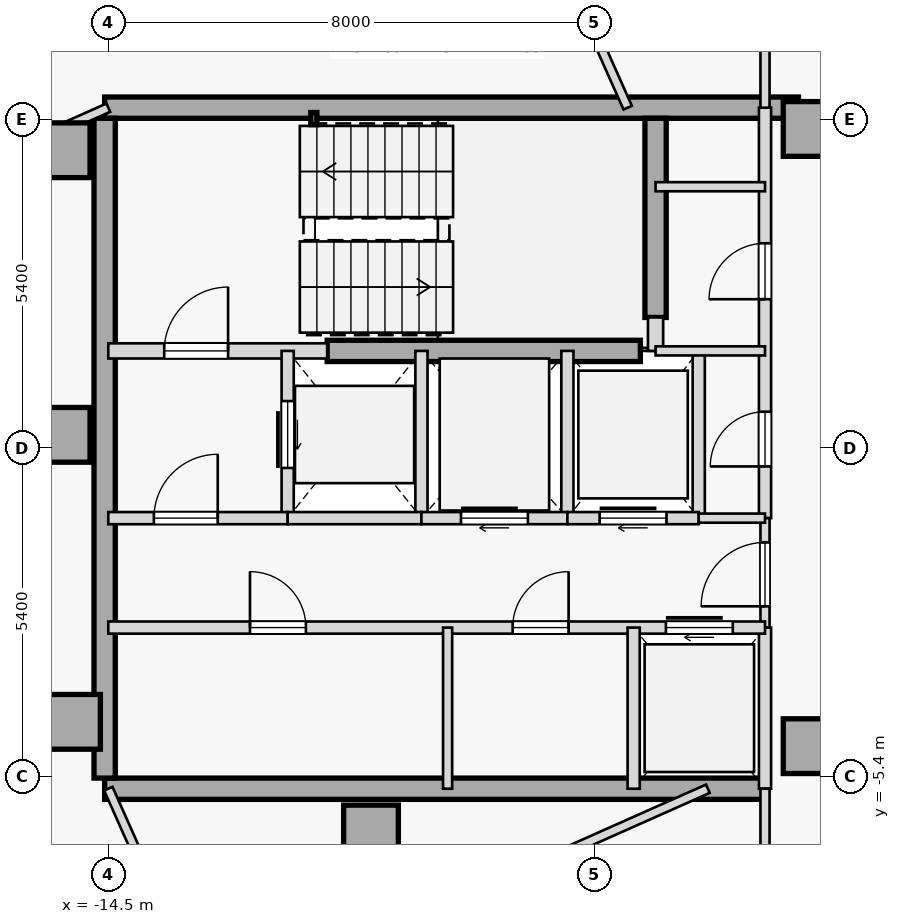
"""IFC4 building model, lengths in metres.
Left out: names, types, materials, properties, quantities, classifications, styles, units other than length and angle.
Written with IfcOpenShell. Run it as: python <this file> out.ifc"""

import sys

from ifc_helpers import new_model, si_unit, direction, frame, frame_2d, origin, origin_2d, place, context, subcontext, project, spatial, rectangle, hollow_rectangle, extrude, element, fill, save


model = new_model("IFC4")
c1 = context("Model", 3, precision=1e-05, world=origin(), true_north=direction((0.0, 1.0)))
c2 = subcontext(c1, "Body", "Model", "MODEL_VIEW")
j1 = project(units=[si_unit("LENGTHUNIT", "METRE"), si_unit("PLANEANGLEUNIT", "RADIAN")], contexts=[c1])
p1 = place(None, origin())
s1 = spatial("IfcSite", under=j1, at=p1, CompositionType="ELEMENT")
p2 = place(p1, origin())
s2 = spatial("IfcBuilding", under=s1, at=p2, CompositionType="ELEMENT")
p3 = place(p2, frame((0.0, 0.0, 295.3)))
s3 = spatial("IfcBuildingStorey", under=s2, at=p3, CompositionType="ELEMENT", Elevation=295.3)
for number, where, z_axis, x_axis in (
    (1, (-15.25, 4.9, 0.0), (0.0, 0.0, 1.0), (1.0, 0.0, 0.0)),
    (2, (-15.25, 0.22, 0.0), (0.0, 0.0, 1.0), (1.0, 0.0, 0.0)),
    (3, (-15.08, -4.5, 0.0), (0.0, 0.0, 1.0), (1.0, 0.0, 0.0)),
    (4, (-10.18, -6.32, 0.0), (0.0, 0.0, 1.0), (1.0, 0.0, 0.0)),
    (5, (-2.95, -4.9, 0.0), (0.0, 0.0, 1.0), (1.0, 0.0, 0.0)),
    (6, (-2.95, 5.25, 0.0), (0.0, 0.0, 1.0), (1.0, 0.0, 0.0)),
):
    element("IfcColumn", number, at=place(p3, frame(where, z_axis=z_axis, x_axis=x_axis)), inside=s3, PredefinedType="COLUMN", context=c2, shape_type="SweptSolid", body=[
        extrude(rectangle(XDim=0.9, YDim=0.9, at=origin_2d()), origin(), (0.0, 0.0, 1.0), 3.35),
    ])
p4 = place(p3, frame((-14.56, 5.6, 0.0), z_axis=(0.0, 0.0, 1.0), x_axis=(1.0, 0.0, 0.0)))
e7 = element("IfcWall", 7, at=p4, inside=s3, PredefinedType="SHEAR", context=c2, shape_type="SweptSolid", body=[
    extrude(rectangle(XDim=11.41, YDim=0.35, at=frame_2d((5.705, 0.0))), origin(), (0.0, 0.0, 1.0), 3.125),
])
p5 = place(p3, frame((-14.56, -5.6, 0.0), z_axis=(0.0, 0.0, 1.0), x_axis=(1.0, 0.0, 0.0)))
e8 = element("IfcWall", 8, at=p5, inside=s3, PredefinedType="SHEAR", context=c2, shape_type="SweptSolid", body=[
    extrude(rectangle(XDim=10.86, YDim=0.35, at=frame_2d((5.43, 0.0))), origin(), (0.0, 0.0, 1.0), 3.125),
])
p6 = place(p3, frame((-14.56, -5.425, 0.0), z_axis=(0.0, 0.0, 1.0), x_axis=(0.0, 1.0, 0.0)))
e9 = element("IfcWall", 9, at=p6, inside=s3, PredefinedType="SHEAR", context=c2, shape_type="SweptSolid", body=[
    extrude(rectangle(XDim=10.85, YDim=0.35, at=frame_2d((5.425, 0.0))), origin(), (0.0, 0.0, 1.0), 3.125),
])
p7 = place(p3, frame((-5.5, 2.15, 0.0), z_axis=(0.0, 0.0, 1.0), x_axis=(0.0, 1.0, 0.0)))
e10 = element("IfcWall", 10, at=p7, inside=s3, PredefinedType="SHEAR", context=c2, shape_type="SweptSolid", body=[
    extrude(rectangle(XDim=3.275, YDim=0.35, at=frame_2d((1.638, 0.0))), origin(), (0.0, 0.0, 1.0), 3.125),
])
p8 = place(p3, frame((-10.9, 1.6, 0.0), z_axis=(0.0, 0.0, 1.0), x_axis=(1.0, 0.0, 0.0)))
e11 = element("IfcWall", 11, at=p8, inside=s3, PredefinedType="SHEAR", context=c2, shape_type="SweptSolid", body=[
    extrude(rectangle(XDim=5.15, YDim=0.35, at=frame_2d((2.575, 0.0))), origin(), (0.0, 0.0, 1.0), 3.125),
])
p9 = place(p3, frame((-11.12, 5.42, 0.0), z_axis=(0.0, 0.0, 1.0), x_axis=(1.0, 0.0, 0.0)))
e12 = element("IfcColumn", 12, at=p9, inside=s3, PredefinedType="COLUMN", context=c2, shape_type="SweptSolid", body=[
    extrude(hollow_rectangle(XDim=0.1, YDim=0.2, WallThickness=0.008, at=origin_2d()), origin(), (0.0, 0.0, 1.0), 3.35),
])
p10 = place(p3, frame((-14.5, 1.6, 0.0), z_axis=(0.0, 0.0, 1.0), x_axis=(1.0, 0.0, 0.0)))
e13 = element("IfcWall", 13, at=p10, inside=s3, PredefinedType="STANDARD", context=c2, shape_type="SweptSolid", body=[
    extrude(rectangle(XDim=3.6, YDim=0.25, at=frame_2d((1.8, 0.0))), origin(), (0.0, 0.0, 1.0), 3.125),
])
p11 = place(p10, frame((0.92, 0.0, 0.0)))
e14 = element("IfcOpeningElement", 14, at=p11, cuts=e13, PredefinedType="OPENING", context=c2, shape_type="SweptSolid", body=[
    extrude(rectangle(XDim=1.05, YDim=2.15, at=frame_2d((0.525, 1.075))), frame((0.0, 0.135, 0.0), z_axis=(0.0, -1.0, 0.0), x_axis=(1.0, 0.0, 0.0)), (0.0, 0.0, 1.0), 0.27),
])
p12 = place(p3, frame((-5.5, 1.6, 0.0), z_axis=(0.0, 0.0, 1.0), x_axis=(0.0, 1.0, 0.0)))
e15 = element("IfcWall", 15, at=p12, inside=s3, PredefinedType="STANDARD", context=c2, shape_type="SweptSolid", body=[
    extrude(rectangle(XDim=0.55, YDim=0.25, at=frame_2d((0.275, 0.0))), origin(), (0.0, 0.0, 1.0), 3.125),
])
p13 = place(p3, frame((-3.7, -1.15, 0.0), z_axis=(0.0, 0.0, 1.0), x_axis=(0.0, 1.0, 0.0)))
e16 = element("IfcWall", 16, at=p13, inside=s3, PredefinedType="STANDARD", context=c2, shape_type="SweptSolid", body=[
    extrude(rectangle(XDim=6.75, YDim=0.2, at=frame_2d((3.375, 0.0))), origin(), (0.0, 0.0, 1.0), 3.125),
])
p14 = place(p13, frame((3.6, 0.0, 0.0)))
e17 = element("IfcOpeningElement", 17, at=p14, cuts=e16, PredefinedType="OPENING", context=c2, shape_type="SweptSolid", body=[
    extrude(rectangle(XDim=0.92, YDim=2.15, at=frame_2d((0.46, 1.075))), frame((0.0, 0.11, 0.0), z_axis=(0.0, -1.0, 0.0), x_axis=(1.0, 0.0, 0.0)), (0.0, 0.0, 1.0), 0.22),
])
p15 = place(p13, frame((0.85, 0.0, 0.0)))
e18 = element("IfcOpeningElement", 18, at=p15, cuts=e16, PredefinedType="OPENING", context=c2, shape_type="SweptSolid", body=[
    extrude(rectangle(XDim=0.9, YDim=2.15, at=frame_2d((0.45, 1.075))), frame((0.0, 0.11, 0.0), z_axis=(0.0, -1.0, 0.0), x_axis=(1.0, 0.0, 0.0)), (0.0, 0.0, 1.0), 0.22),
])
p16 = place(p3, frame((-3.7, -2.95, 0.0), z_axis=(0.0, 0.0, 1.0), x_axis=(0.0, 1.0, 0.0)))
e19 = element("IfcWall", 19, at=p16, inside=s3, PredefinedType="PARTITIONING", context=c2, shape_type="SweptSolid", body=[
    extrude(rectangle(XDim=1.8, YDim=0.15, at=frame_2d((0.9, 0.0))), origin(), (0.0, 0.0, 1.0), 3.125),
])
p17 = place(p16, frame((0.35, 0.0, 0.0)))
e20 = element("IfcOpeningElement", 20, at=p17, cuts=e19, PredefinedType="OPENING", context=c2, shape_type="SweptSolid", body=[
    extrude(rectangle(XDim=1.05, YDim=2.18, at=frame_2d((0.525, 1.09))), frame((0.0, 0.085, 0.0), z_axis=(0.0, -1.0, 0.0), x_axis=(1.0, 0.0, 0.0)), (0.0, 0.0, 1.0), 0.17),
])
p18 = place(p3, frame((-3.7, -5.6, 0.0), z_axis=(0.0, 0.0, 1.0), x_axis=(0.0, 1.0, 0.0)))
e21 = element("IfcWall", 21, at=p18, inside=s3, PredefinedType="STANDARD", context=c2, shape_type="SweptSolid", body=[
    extrude(rectangle(XDim=2.65, YDim=0.2, at=frame_2d((1.325, 0.0))), origin(), (0.0, 0.0, 1.0), 3.125),
])
p19 = place(p3, frame((-11.55, -1.15, 0.0), z_axis=(0.0, 0.0, 1.0), x_axis=(0.0, 1.0, 0.0)))
e22 = element("IfcWall", 22, at=p19, inside=s3, PredefinedType="STANDARD", context=c2, shape_type="SweptSolid", body=[
    extrude(rectangle(XDim=2.75, YDim=0.2, at=frame_2d((1.375, 0.0))), origin(), (0.0, 0.0, 1.0), 3.125),
])
p20 = place(p19, frame((0.825, 0.0, 0.0)))
e23 = element("IfcOpeningElement", 23, at=p20, cuts=e22, PredefinedType="OPENING", context=c2, shape_type="SweptSolid", body=[
    extrude(rectangle(XDim=1.1, YDim=2.15, at=frame_2d((0.55, 1.075))), frame((0.0, 0.11, 0.0), z_axis=(0.0, -1.0, 0.0), x_axis=(1.0, 0.0, 0.0)), (0.0, 0.0, 1.0), 0.22),
])
p21 = place(p3, frame((-9.35, -1.15, 0.0), z_axis=(0.0, 0.0, 1.0), x_axis=(0.0, 1.0, 0.0)))
e24 = element("IfcWall", 24, at=p21, inside=s3, PredefinedType="STANDARD", context=c2, shape_type="SweptSolid", body=[
    extrude(rectangle(XDim=2.75, YDim=0.2, at=frame_2d((1.375, 0.0))), origin(), (0.0, 0.0, 1.0), 3.125),
])
p22 = place(p3, frame((-14.5, -1.15, 0.0), z_axis=(0.0, 0.0, 1.0), x_axis=(1.0, 0.0, 0.0)))
e25 = element("IfcWall", 25, at=p22, inside=s3, PredefinedType="STANDARD", context=c2, shape_type="SweptSolid", body=[
    extrude(rectangle(XDim=2.95, YDim=0.2, at=frame_2d((1.475, 0.0))), origin(), (0.0, 0.0, 1.0), 3.125),
])
p23 = place(p22, frame((0.75, 0.0, 0.0)))
e26 = element("IfcOpeningElement", 26, at=p23, cuts=e25, PredefinedType="OPENING", context=c2, shape_type="SweptSolid", body=[
    extrude(rectangle(XDim=1.05, YDim=2.18, at=frame_2d((0.525, 1.09))), frame((0.0, 0.11, 0.0), z_axis=(0.0, -1.0, 0.0), x_axis=(1.0, 0.0, 0.0)), (0.0, 0.0, 1.0), 0.22),
])
p24 = place(p3, frame((-11.55, -1.15, 0.0), z_axis=(0.0, 0.0, 1.0), x_axis=(1.0, 0.0, 0.0)))
e27 = element("IfcWall", 27, at=p24, inside=s3, PredefinedType="STANDARD", context=c2, shape_type="SweptSolid", body=[
    extrude(rectangle(XDim=2.2, YDim=0.2, at=frame_2d((1.1, 0.0))), origin(), (0.0, 0.0, 1.0), 3.125),
])
p25 = place(p3, frame((-6.95, -1.15, 0.0), z_axis=(0.0, 0.0, 1.0), x_axis=(0.0, 1.0, 0.0)))
e28 = element("IfcWall", 28, at=p25, inside=s3, PredefinedType="STANDARD", context=c2, shape_type="SweptSolid", body=[
    extrude(rectangle(XDim=2.75, YDim=0.2, at=frame_2d((1.375, 0.0))), origin(), (0.0, 0.0, 1.0), 3.125),
])
p26 = place(p3, frame((-9.35, -1.15, 0.0), z_axis=(0.0, 0.0, 1.0), x_axis=(1.0, 0.0, 0.0)))
e29 = element("IfcWall", 29, at=p26, inside=s3, PredefinedType="STANDARD", context=c2, shape_type="SweptSolid", body=[
    extrude(rectangle(XDim=2.4, YDim=0.2, at=frame_2d((1.2, 0.0))), origin(), (0.0, 0.0, 1.0), 3.125),
])
p27 = place(p26, frame((0.65, 0.0, 0.0)))
e30 = element("IfcOpeningElement", 30, at=p27, cuts=e29, PredefinedType="OPENING", context=c2, shape_type="SweptSolid", body=[
    extrude(rectangle(XDim=1.1, YDim=2.15, at=frame_2d((0.55, 1.075))), frame((0.0, 0.11, 0.0), z_axis=(0.0, -1.0, 0.0), x_axis=(1.0, 0.0, 0.0)), (0.0, 0.0, 1.0), 0.22),
])
p28 = place(p3, frame((-4.79, -1.15, 0.0), z_axis=(0.0, 0.0, 1.0), x_axis=(0.0, 1.0, 0.0)))
e31 = element("IfcWall", 31, at=p28, inside=s3, PredefinedType="STANDARD", context=c2, shape_type="SweptSolid", body=[
    extrude(rectangle(XDim=2.75, YDim=0.2, at=frame_2d((1.375, 0.0))), origin(), (0.0, 0.0, 1.0), 3.125),
])
p29 = place(p3, frame((-6.95, -1.15, 0.0), z_axis=(0.0, 0.0, 1.0), x_axis=(1.0, 0.0, 0.0)))
e32 = element("IfcWall", 32, at=p29, inside=s3, PredefinedType="STANDARD", context=c2, shape_type="SweptSolid", body=[
    extrude(rectangle(XDim=2.16, YDim=0.2, at=frame_2d((1.08, 0.0))), origin(), (0.0, 0.0, 1.0), 3.125),
])
p30 = place(p29, frame((0.53, 0.0, 0.0)))
e33 = element("IfcOpeningElement", 33, at=p30, cuts=e32, PredefinedType="OPENING", context=c2, shape_type="SweptSolid", body=[
    extrude(rectangle(XDim=1.1, YDim=2.15, at=frame_2d((0.55, 1.075))), frame((0.0, 0.11, 0.0), z_axis=(0.0, -1.0, 0.0), x_axis=(1.0, 0.0, 0.0)), (0.0, 0.0, 1.0), 0.22),
])
p31 = place(p3, frame((-4.79, -1.15, 0.0), z_axis=(0.0, 0.0, 1.0), x_axis=(1.0, 0.0, 0.0)))
e34 = element("IfcWall", 34, at=p31, inside=s3, PredefinedType="PARTITIONING", context=c2, shape_type="SweptSolid", body=[
    extrude(rectangle(XDim=1.09, YDim=0.15, at=frame_2d((0.545, 0.0))), origin(), (0.0, 0.0, 1.0), 3.125),
])
p32 = place(p3, frame((-14.5, -2.95, 0.0), z_axis=(0.0, 0.0, 1.0), x_axis=(1.0, 0.0, 0.0)))
e35 = element("IfcWall", 35, at=p32, inside=s3, PredefinedType="STANDARD", context=c2, shape_type="SweptSolid", body=[
    extrude(rectangle(XDim=10.8, YDim=0.2, at=frame_2d((5.4, 0.0))), origin(), (0.0, 0.0, 1.0), 3.125),
])
p33 = place(p32, frame((9.17, 0.0, 0.0)))
e36 = element("IfcOpeningElement", 36, at=p33, cuts=e35, PredefinedType="OPENING", context=c2, shape_type="SweptSolid", body=[
    extrude(rectangle(XDim=1.1, YDim=2.15, at=frame_2d((0.55, 1.075))), frame((0.0, 0.11, 0.0), z_axis=(0.0, -1.0, 0.0), x_axis=(1.0, 0.0, 0.0)), (0.0, 0.0, 1.0), 0.22),
])
p34 = place(p32, frame((2.33, 0.0, 0.0)))
e37 = element("IfcOpeningElement", 37, at=p34, cuts=e35, PredefinedType="OPENING", context=c2, shape_type="SweptSolid", body=[
    extrude(rectangle(XDim=0.92, YDim=2.15, at=frame_2d((0.46, 1.075))), frame((0.0, 0.11, 0.0), z_axis=(0.0, -1.0, 0.0), x_axis=(1.0, 0.0, 0.0)), (0.0, 0.0, 1.0), 0.22),
])
p35 = place(p32, frame((6.65, 0.0, 0.0)))
e38 = element("IfcOpeningElement", 38, at=p35, cuts=e35, PredefinedType="OPENING", context=c2, shape_type="SweptSolid", body=[
    extrude(rectangle(XDim=0.92, YDim=2.15, at=frame_2d((0.46, 1.075))), frame((0.0, 0.11, 0.0), z_axis=(0.0, -1.0, 0.0), x_axis=(1.0, 0.0, 0.0)), (0.0, 0.0, 1.0), 0.22),
])
p36 = place(p3, frame((-5.86, -5.6, 0.0), z_axis=(0.0, 0.0, 1.0), x_axis=(0.0, 1.0, 0.0)))
e39 = element("IfcWall", 39, at=p36, inside=s3, PredefinedType="STANDARD", context=c2, shape_type="SweptSolid", body=[
    extrude(rectangle(XDim=2.65, YDim=0.2, at=frame_2d((1.325, 0.0))), origin(), (0.0, 0.0, 1.0), 3.125),
])
p37 = place(p3, frame((-8.92, -5.6, 0.0), z_axis=(0.0, 0.0, 1.0), x_axis=(0.0, 1.0, 0.0)))
e40 = element("IfcWall", 40, at=p37, inside=s3, PredefinedType="PARTITIONING", context=c2, shape_type="SweptSolid", body=[
    extrude(rectangle(XDim=2.65, YDim=0.15, at=frame_2d((1.325, 0.0))), origin(), (0.0, 0.0, 1.0), 3.125),
])
for number, where, z_axis, x_axis in (
    (41, (-5.5, 4.3, 0.0), (0.0, 0.0, 1.0), (1.0, 0.0, 0.0)),
    (42, (-5.5, 1.6, 0.0), (0.0, 0.0, 1.0), (1.0, 0.0, 0.0)),
):
    element("IfcWall", number, at=place(p3, frame(where, z_axis=z_axis, x_axis=x_axis)), inside=s3, PredefinedType="PARTITIONING", context=c2, shape_type="SweptSolid", body=[
        extrude(rectangle(XDim=1.8, YDim=0.15, at=frame_2d((0.9, 0.0))), origin(), (0.0, 0.0, 1.0), 3.125),
    ])
p38 = place(p3, frame((-18.549, 5.57, 0.0), z_axis=(0.0, 0.0, 1.0), x_axis=(0.913545955058, 0.40673552586, 0.0)))
e43 = element("IfcWall", 43, at=p38, inside=s3, PredefinedType="PARTITIONING", context=c2, shape_type="SweptSolid", body=[
    extrude(rectangle(XDim=13.808, YDim=0.15, at=frame_2d((6.904, 0.0))), origin(), (0.0, 0.0, 1.0), 3.125),
])
p39 = place(p38, frame((6.429, 0.0, 0.0)))
e44 = element("IfcOpeningElement", 44, at=p39, cuts=e43, PredefinedType="OPENING", context=c2, shape_type="SweptSolid", body=[
    extrude(rectangle(XDim=0.95, YDim=2.15, at=frame_2d((0.475, 1.075))), frame((0.0, 0.085, 0.0), z_axis=(0.0, -1.0, 0.0), x_axis=(1.0, 0.0, 0.0)), (0.0, 0.0, 1.0), 0.17),
])
p40 = place(p3, frame((-3.7, -8.925, 0.0), z_axis=(0.0, 0.0, 1.0), x_axis=(7.3410659e-05, 0.999999997305, 0.0)))
e45 = element("IfcWall", 45, at=p40, inside=s3, PredefinedType="PARTITIONING", context=c2, shape_type="SweptSolid", body=[
    extrude(rectangle(XDim=3.326, YDim=0.15, at=frame_2d((1.663, 0.0))), origin(), (0.0, 0.0, 1.0), 3.125),
])
p41 = place(p40, frame((1.203, 0.0, 0.0)))
e46 = element("IfcOpeningElement", 46, at=p41, cuts=e45, PredefinedType="OPENING", context=c2, shape_type="SweptSolid", body=[
    extrude(rectangle(XDim=0.92, YDim=2.15, at=frame_2d((0.46, 1.075))), frame((0.0, 0.085, 0.0), z_axis=(0.0, -1.0, 0.0), x_axis=(1.0, 0.0, 0.0)), (0.0, 0.0, 1.0), 0.17),
])
p42 = place(p3, frame((-18.661, 3.747, 0.0), z_axis=(0.0, 0.0, 1.0), x_axis=(0.913535055583, 0.40676000568, 0.0)))
e47 = element("IfcWall", 47, at=p42, inside=s3, PredefinedType="PARTITIONING", context=c2, shape_type="SweptSolid", body=[
    extrude(rectangle(XDim=4.555, YDim=0.15, at=frame_2d((2.277, 0.0))), origin(), (0.0, 0.0, 1.0), 3.125),
])
p43 = place(p42, frame((1.134, 0.0, 0.0)))
e48 = element("IfcOpeningElement", 48, at=p43, cuts=e47, PredefinedType="OPENING", context=c2, shape_type="SweptSolid", body=[
    extrude(rectangle(XDim=0.92, YDim=2.15, at=frame_2d((0.46, 1.075))), frame((0.0, 0.085, 0.0), z_axis=(0.0, -1.0, 0.0), x_axis=(1.0, 0.0, 0.0)), (0.0, 0.0, 1.0), 0.17),
])
p44 = place(p3, frame((-3.7, 5.6, 0.0), z_axis=(0.0, 0.0, 1.0), x_axis=(5.077173e-05, 0.999999998711, 0.0)))
e49 = element("IfcWall", 49, at=p44, inside=s3, PredefinedType="PARTITIONING", context=c2, shape_type="SweptSolid", body=[
    extrude(rectangle(XDim=4.809, YDim=0.15, at=frame_2d((2.404, 0.0))), origin(), (0.0, 0.0, 1.0), 3.125),
])
p45 = place(p44, frame((1.944, 0.0, 0.0)))
e50 = element("IfcOpeningElement", 50, at=p45, cuts=e49, PredefinedType="OPENING", context=c2, shape_type="SweptSolid", body=[
    extrude(rectangle(XDim=0.92, YDim=2.15, at=frame_2d((0.46, 1.075))), frame((0.0, 0.085, 0.0), z_axis=(0.0, -1.0, 0.0), x_axis=(1.0, 0.0, 0.0)), (0.0, 0.0, 1.0), 0.17),
])
p46 = place(p3, frame((-13.017, -8.93, 0.0), z_axis=(0.0, 0.0, 1.0), x_axis=(-0.406722395322, 0.913551801018, 0.0)))
e51 = element("IfcWall", 51, at=p46, inside=s3, PredefinedType="PARTITIONING", context=c2, shape_type="SweptSolid", body=[
    extrude(rectangle(XDim=3.646, YDim=0.15, at=frame_2d((1.823, 0.0))), origin(), (0.0, 0.0, 1.0), 3.125),
])
p47 = place(p3, frame((-12.868, -9.264, 0.0), z_axis=(0.0, 0.0, 1.0), x_axis=(0.913545332854, 0.406736923356, 0.0)))
e52 = element("IfcWall", 52, at=p47, inside=s3, PredefinedType="PARTITIONING", context=c2, shape_type="SweptSolid", body=[
    extrude(rectangle(XDim=9.007, YDim=0.15, at=frame_2d((4.504, 0.0))), origin(), (0.0, 0.0, 1.0), 3.125),
])
p48 = place(p47, frame((1.521, 0.0, 0.0)))
e53 = element("IfcOpeningElement", 53, at=p48, cuts=e52, PredefinedType="OPENING", context=c2, shape_type="SweptSolid", body=[
    extrude(rectangle(XDim=0.92, YDim=2.15, at=frame_2d((0.46, 1.075))), frame((0.0, 0.085, 0.0), z_axis=(0.0, -1.0, 0.0), x_axis=(1.0, 0.0, 0.0)), (0.0, 0.0, 1.0), 0.17),
])
p49 = place(p3, frame((-5.958, 5.6, 0.0), z_axis=(0.0, 0.0, 1.0), x_axis=(-0.406738231884, 0.913544750258, 0.0)))
e54 = element("IfcWall", 54, at=p49, inside=s3, PredefinedType="PARTITIONING", context=c2, shape_type="SweptSolid", body=[
    extrude(rectangle(XDim=3.474, YDim=0.15, at=frame_2d((1.737, 0.0))), origin(), (0.0, 0.0, 1.0), 3.125),
])
p50 = place(p11, origin())
e55 = element("IfcDoor", 55, at=p50, inside=s3, OperationType="SINGLE_SWING_RIGHT", PredefinedType="DOOR", context=c2, shape_type="SweptSolid", body=[
    extrude(rectangle(XDim=1.05, YDim=2.15, at=frame_2d((0.525, 1.075))), frame((0.0, 0.025, 0.0), z_axis=(0.0, -1.0, 0.0), x_axis=(1.0, 0.0, 0.0)), (0.0, 0.0, 1.0), 0.05),
])
fill(e14, e55)
p51 = place(p23, origin())
e56 = element("IfcDoor", 56, at=p51, inside=s3, OperationType="SINGLE_SWING_RIGHT", PredefinedType="DOOR", context=c2, shape_type="SweptSolid", body=[
    extrude(rectangle(XDim=1.05, YDim=2.18, at=frame_2d((0.525, 1.09))), frame((0.0, 0.025, 0.0), z_axis=(0.0, -1.0, 0.0), x_axis=(1.0, 0.0, 0.0)), (0.0, 0.0, 1.0), 0.05),
])
fill(e26, e56)
p52 = place(p17, origin())
e57 = element("IfcDoor", 57, at=p52, inside=s3, OperationType="SINGLE_SWING_LEFT", PredefinedType="DOOR", context=c2, shape_type="SweptSolid", body=[
    extrude(rectangle(XDim=1.05, YDim=2.18, at=frame_2d((0.525, 1.09))), frame((0.0, 0.025, 0.0), z_axis=(0.0, -1.0, 0.0), x_axis=(1.0, 0.0, 0.0)), (0.0, 0.0, 1.0), 0.05),
])
fill(e20, e57)
p53 = place(p20, origin())
e58 = element("IfcDoor", 58, at=p53, inside=s3, OperationType="SLIDING_TO_RIGHT", PredefinedType="DOOR", context=c2, shape_type="SweptSolid", body=[
    extrude(rectangle(XDim=1.1, YDim=2.15, at=frame_2d((0.55, 1.075))), frame((0.0, 0.025, 0.0), z_axis=(0.0, -1.0, 0.0), x_axis=(1.0, 0.0, 0.0)), (0.0, 0.0, 1.0), 0.05),
])
fill(e23, e58)
p54 = place(p27, origin())
e59 = element("IfcDoor", 59, at=p54, inside=s3, OperationType="SLIDING_TO_RIGHT", PredefinedType="DOOR", context=c2, shape_type="SweptSolid", body=[
    extrude(rectangle(XDim=1.1, YDim=2.15, at=frame_2d((0.55, 1.075))), frame((0.0, 0.025, 0.0), z_axis=(0.0, -1.0, 0.0), x_axis=(1.0, 0.0, 0.0)), (0.0, 0.0, 1.0), 0.05),
])
fill(e30, e59)
p55 = place(p30, origin())
e60 = element("IfcDoor", 60, at=p55, inside=s3, OperationType="SLIDING_TO_RIGHT", PredefinedType="DOOR", context=c2, shape_type="SweptSolid", body=[
    extrude(rectangle(XDim=1.1, YDim=2.15, at=frame_2d((0.55, 1.075))), frame((0.0, 0.025, 0.0), z_axis=(0.0, -1.0, 0.0), x_axis=(1.0, 0.0, 0.0)), (0.0, 0.0, 1.0), 0.05),
])
fill(e33, e60)
p56 = place(p33, origin())
e61 = element("IfcDoor", 61, at=p56, inside=s3, OperationType="SLIDING_TO_RIGHT", PredefinedType="DOOR", context=c2, shape_type="SweptSolid", body=[
    extrude(rectangle(XDim=1.1, YDim=2.15, at=frame_2d((0.55, 1.075))), frame((0.0, 0.025, 0.0), z_axis=(0.0, -1.0, 0.0), x_axis=(1.0, 0.0, 0.0)), (0.0, 0.0, 1.0), 0.05),
])
fill(e36, e61)
p57 = place(p34, origin())
e62 = element("IfcDoor", 62, at=p57, inside=s3, OperationType="SINGLE_SWING_LEFT", PredefinedType="DOOR", context=c2, shape_type="SweptSolid", body=[
    extrude(rectangle(XDim=0.92, YDim=2.15, at=frame_2d((0.46, 1.075))), frame((0.0, 0.025, 0.0), z_axis=(0.0, -1.0, 0.0), x_axis=(1.0, 0.0, 0.0)), (0.0, 0.0, 1.0), 0.05),
])
fill(e37, e62)
p58 = place(p35, origin())
e63 = element("IfcDoor", 63, at=p58, inside=s3, OperationType="SINGLE_SWING_RIGHT", PredefinedType="DOOR", context=c2, shape_type="SweptSolid", body=[
    extrude(rectangle(XDim=0.92, YDim=2.15, at=frame_2d((0.46, 1.075))), frame((0.0, 0.025, 0.0), z_axis=(0.0, -1.0, 0.0), x_axis=(1.0, 0.0, 0.0)), (0.0, 0.0, 1.0), 0.05),
])
fill(e38, e63)
p59 = place(p14, origin())
e64 = element("IfcDoor", 64, at=p59, inside=s3, OperationType="SINGLE_SWING_LEFT", PredefinedType="DOOR", context=c2, shape_type="SweptSolid", body=[
    extrude(rectangle(XDim=0.92, YDim=2.15, at=frame_2d((0.46, 1.075))), frame((0.0, 0.025, 0.0), z_axis=(0.0, -1.0, 0.0), x_axis=(1.0, 0.0, 0.0)), (0.0, 0.0, 1.0), 0.05),
])
fill(e17, e64)
p60 = place(p15, origin())
e65 = element("IfcDoor", 65, at=p60, inside=s3, OperationType="SINGLE_SWING_LEFT", PredefinedType="DOOR", context=c2, shape_type="SweptSolid", body=[
    extrude(rectangle(XDim=0.9, YDim=2.15, at=frame_2d((0.45, 1.075))), frame((0.0, 0.025, 0.0), z_axis=(0.0, -1.0, 0.0), x_axis=(1.0, 0.0, 0.0)), (0.0, 0.0, 1.0), 0.05),
])
fill(e18, e65)
save(model, sys.argv[1])
